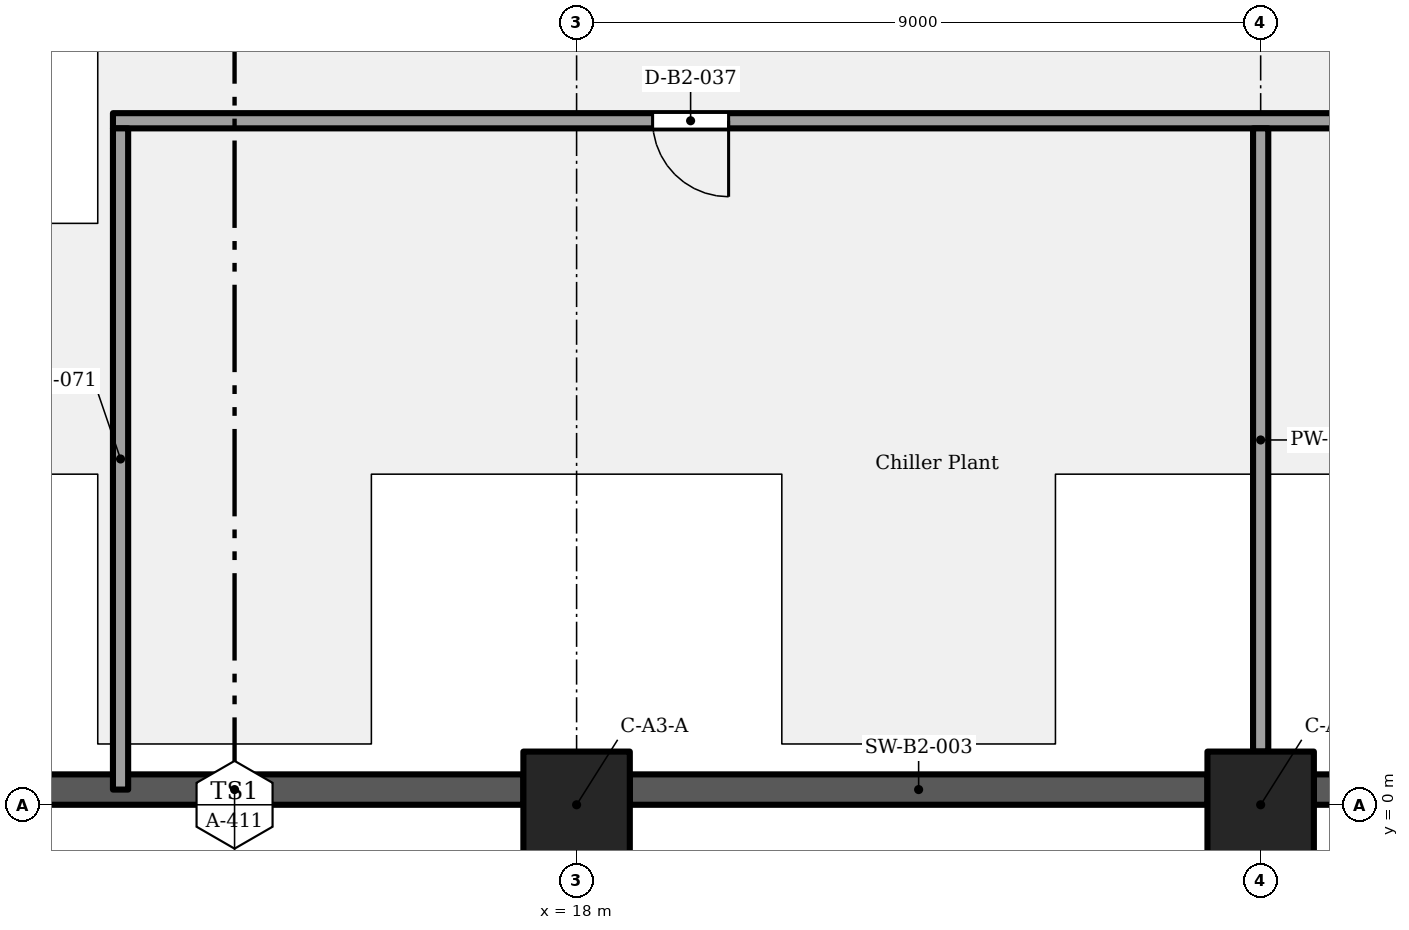
"""IFC4 building model, lengths in metres.
Left out: names, types, materials, properties, quantities, classifications, styles, units other than length and angle.
Written with IfcOpenShell. Run it as: python <this file> out.ifc"""

import sys

from ifc_helpers import new_model, si_unit, direction, frame, frame_2d, origin, origin_2d, place, context, subcontext, project, spatial, rectangle, extrude, element, fill, save


model = new_model("IFC4")
c1 = context("Model", 3, precision=1e-05, world=origin(), true_north=direction((0.0, 1.0)))
c2 = subcontext(c1, "Body", "Model", "MODEL_VIEW")
j1 = project(units=[si_unit("LENGTHUNIT", "METRE"), si_unit("PLANEANGLEUNIT", "RADIAN")], contexts=[c1])
p1 = place(None, origin())
s1 = spatial("IfcSite", under=j1, at=p1, CompositionType="ELEMENT")
p2 = place(p1, origin())
s2 = spatial("IfcBuilding", under=s1, at=p2, CompositionType="ELEMENT")
p3 = place(p2, frame((0.0, 0.0, -8.4)))
s3 = spatial("IfcBuildingStorey", under=s2, at=p3, CompositionType="ELEMENT", Elevation=-8.4)
for number, where, z_axis, x_axis in (
    (1, (18.0, 0.0, 0.0), (0.0, 0.0, 1.0), (1.0, 0.0, 0.0)),
    (2, (27.0, 0.0, 0.0), (0.0, 0.0, 1.0), (1.0, 0.0, 0.0)),
):
    element("IfcColumn", number, at=place(p3, frame(where, z_axis=z_axis, x_axis=x_axis)), inside=s3, PredefinedType="COLUMN", context=c2, shape_type="SweptSolid", body=[
        extrude(rectangle(XDim=1.4, YDim=1.4, at=origin_2d()), origin(), (0.0, 0.0, 1.0), 4.2),
    ])
for number, where, z_axis, x_axis in (
    (3, (9.7, 0.2, 0.0), (0.0, 0.0, 1.0), (1.0, 0.0, 0.0)),
    (4, (18.7, 0.2, 0.0), (0.0, 0.0, 1.0), (1.0, 0.0, 0.0)),
    (5, (27.7, 0.2, 0.0), (0.0, 0.0, 1.0), (1.0, 0.0, 0.0)),
):
    element("IfcWall", number, at=place(p3, frame(where, z_axis=z_axis, x_axis=x_axis)), inside=s3, PredefinedType="SOLIDWALL", context=c2, shape_type="SweptSolid", body=[
        extrude(rectangle(XDim=7.6, YDim=0.4, at=frame_2d((3.8, 0.0))), origin(), (0.0, 0.0, 1.0), 3.8),
    ])
p4 = place(p3, frame((11.9, 9.0, 0.0), z_axis=(0.0, 0.0, 1.0), x_axis=(1.0, 0.0, 0.0)))
e6 = element("IfcWall", 6, at=p4, inside=s3, PredefinedType="PARTITIONING", context=c2, shape_type="SweptSolid", body=[
    extrude(rectangle(XDim=66.2, YDim=0.2, at=frame_2d((33.1, 0.0))), origin(), (0.0, 0.0, 1.0), 3.8),
])
p5 = place(p4, frame((8.1, 0.0, 0.0), z_axis=(0.0, 0.0, 1.0), x_axis=(-1.0, 0.0, 0.0)))
e7 = element("IfcOpeningElement", 7, at=p5, cuts=e6, PredefinedType="OPENING", context=c2, shape_type="SweptSolid", body=[
    extrude(rectangle(XDim=1.0, YDim=2.1, at=frame_2d((0.5, 1.05))), frame((0.0, 0.11, 0.0), z_axis=(0.0, -1.0, 0.0), x_axis=(1.0, 0.0, 0.0)), (0.0, 0.0, 1.0), 0.22),
])
p6 = place(p4, frame((25.0, 0.0, 0.0), z_axis=(0.0, 0.0, 1.0), x_axis=(-1.0, 0.0, 0.0)))
e8 = element("IfcOpeningElement", 8, at=p6, cuts=e6, PredefinedType="OPENING", context=c2, shape_type="SweptSolid", body=[
    extrude(rectangle(XDim=1.8, YDim=2.4, at=frame_2d((0.9, 1.2))), frame((0.0, 0.11, 0.0), z_axis=(0.0, -1.0, 0.0), x_axis=(1.0, 0.0, 0.0)), (0.0, 0.0, 1.0), 0.22),
])
p7 = place(p4, frame((43.0, 0.0, 0.0), z_axis=(0.0, 0.0, 1.0), x_axis=(-1.0, 0.0, 0.0)))
e9 = element("IfcOpeningElement", 9, at=p7, cuts=e6, PredefinedType="OPENING", context=c2, shape_type="SweptSolid", body=[
    extrude(rectangle(XDim=1.8, YDim=2.4, at=frame_2d((0.9, 1.2))), frame((0.0, 0.11, 0.0), z_axis=(0.0, -1.0, 0.0), x_axis=(1.0, 0.0, 0.0)), (0.0, 0.0, 1.0), 0.22),
])
p8 = place(p4, frame((59.1, 0.0, 0.0), z_axis=(0.0, 0.0, 1.0), x_axis=(-1.0, 0.0, 0.0)))
e10 = element("IfcOpeningElement", 10, at=p8, cuts=e6, PredefinedType="OPENING", context=c2, shape_type="SweptSolid", body=[
    extrude(rectangle(XDim=1.0, YDim=2.1, at=frame_2d((0.5, 1.05))), frame((0.0, 0.11, 0.0), z_axis=(0.0, -1.0, 0.0), x_axis=(1.0, 0.0, 0.0)), (0.0, 0.0, 1.0), 0.22),
])
p9 = place(p3, frame((12.0, 0.2, 0.0), z_axis=(0.0, 0.0, 1.0), x_axis=(0.0, 1.0, 0.0)))
e11 = element("IfcWall", 11, at=p9, inside=s3, PredefinedType="PARTITIONING", context=c2, shape_type="SweptSolid", body=[
    extrude(rectangle(XDim=8.7, YDim=0.2, at=frame_2d((4.35, 0.0))), origin(), (0.0, 0.0, 1.0), 3.8),
])
p10 = place(p3, frame((27.0, 0.7, 0.0), z_axis=(0.0, 0.0, 1.0), x_axis=(0.0, 1.0, 0.0)))
e12 = element("IfcWall", 12, at=p10, inside=s3, PredefinedType="PARTITIONING", context=c2, shape_type="SweptSolid", body=[
    extrude(rectangle(XDim=8.2, YDim=0.2, at=frame_2d((4.1, 0.0))), origin(), (0.0, 0.0, 1.0), 3.05),
])
p11 = place(p5, origin())
e13 = element("IfcDoor", 13, at=p11, inside=s3, OperationType="SINGLE_SWING_LEFT", PredefinedType="DOOR", context=c2, shape_type="SweptSolid", body=[
    extrude(rectangle(XDim=1.0, YDim=2.1, at=frame_2d((0.5, 1.05))), frame((0.0, 0.025, 0.0), z_axis=(0.0, -1.0, 0.0), x_axis=(1.0, 0.0, 0.0)), (0.0, 0.0, 1.0), 0.05),
])
fill(e7, e13)
save(model, sys.argv[1])
